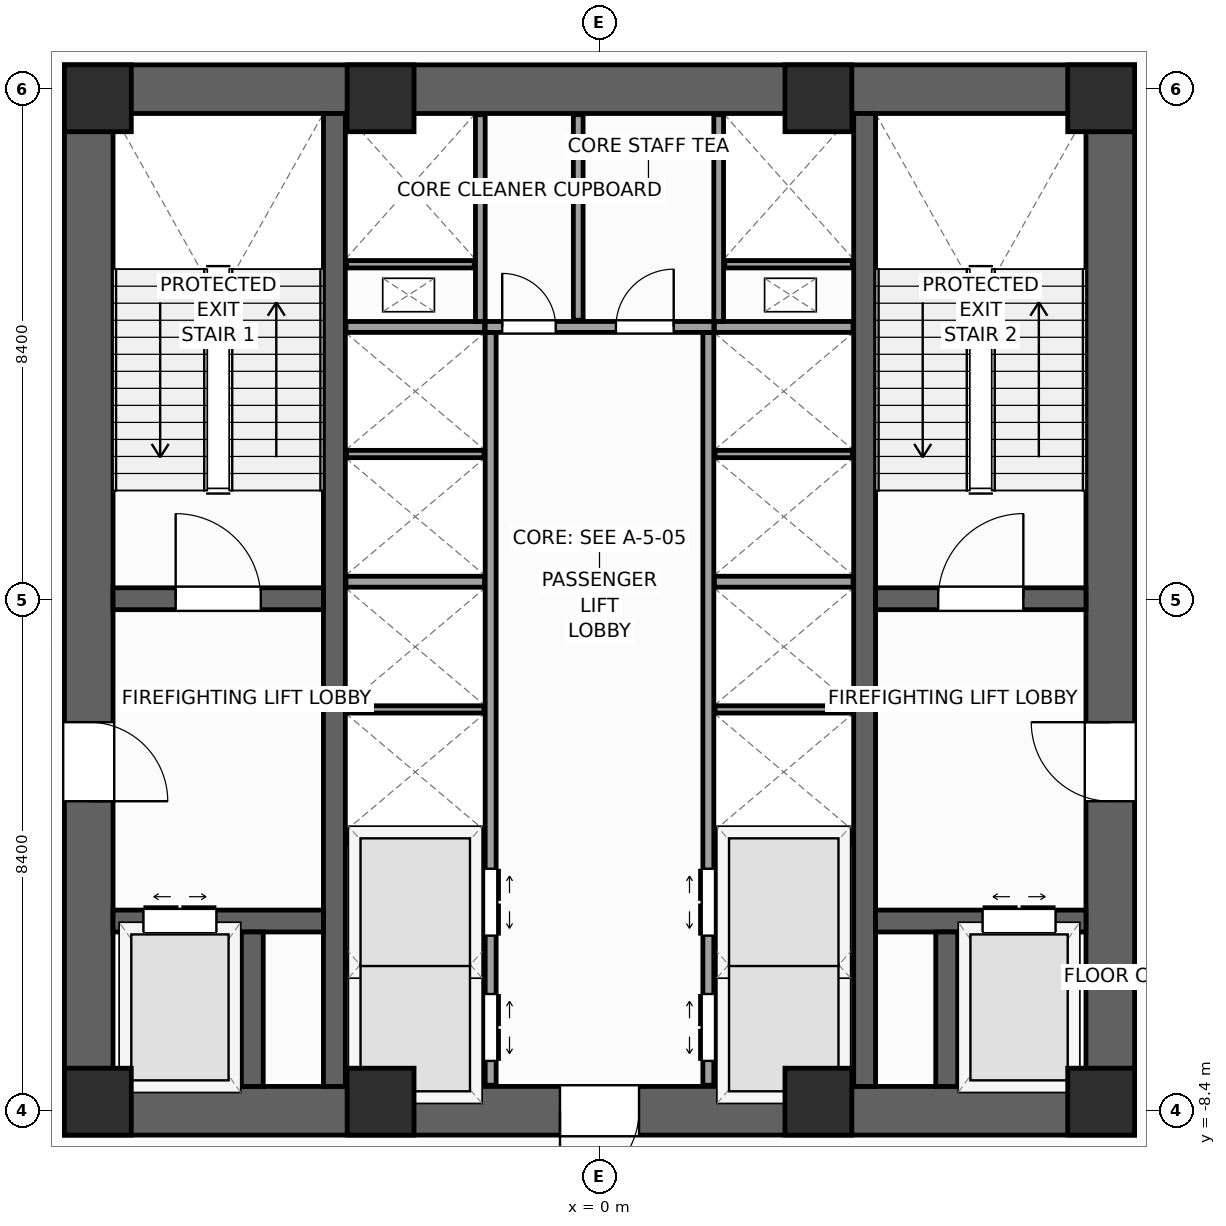
"""IFC4 building model, lengths in metres.
Left out: names, types, materials, properties, quantities, classifications, styles, units other than length and angle.
Written with IfcOpenShell. Run it as: python <this file> out.ifc"""

import sys

from ifc_helpers import new_model, si_unit, direction, frame, frame_2d, origin, origin_2d, place, context, subcontext, project, spatial, rectangle, extrude, source, transform, mapped, element, fill, save


model = new_model("IFC4")
c1 = context("Model", 3, precision=1e-05, world=origin(), true_north=direction((0.0, 1.0)))
c2 = subcontext(c1, "Body", "Model", "MODEL_VIEW")
j1 = project(units=[si_unit("LENGTHUNIT", "METRE"), si_unit("PLANEANGLEUNIT", "RADIAN")], contexts=[c1])
p1 = place(None, origin())
s1 = spatial("IfcSite", under=j1, at=p1, CompositionType="ELEMENT")
p2 = place(p1, origin())
s2 = spatial("IfcBuilding", under=s1, at=p2, CompositionType="ELEMENT")
p3 = place(p2, frame((0.0, 0.0, 11.0)))
s3 = spatial("IfcBuildingStorey", under=s2, at=p3, CompositionType="ELEMENT", Elevation=11.0)
p4 = place(p3, frame((-8.8, -8.4, 0.0), z_axis=(0.0, 0.0, 1.0), x_axis=(1.0, 0.0, 0.0)))
e1 = element("IfcWall", 1, at=p4, inside=s3, PredefinedType="SHEAR", context=c2, shape_type="SweptSolid", body=[
    extrude(rectangle(XDim=17.6, YDim=0.8, at=frame_2d((8.8, 0.0))), origin(), (0.0, 0.0, 1.0), 5.0),
])
p5 = place(p4, frame((8.15, 0.0, 0.0)))
e2 = element("IfcOpeningElement", 2, at=p5, cuts=e1, PredefinedType="OPENING", context=c2, shape_type="SweptSolid", body=[
    extrude(rectangle(XDim=1.3, YDim=2.2, at=frame_2d((0.65, 1.1))), frame((0.0, 0.41, 0.0), z_axis=(0.0, -1.0, 0.0), x_axis=(1.0, 0.0, 0.0)), (0.0, 0.0, 1.0), 0.82),
])
p6 = place(p3, frame((-8.8, 8.4, 0.0), z_axis=(0.0, 0.0, 1.0), x_axis=(1.0, 0.0, 0.0)))
e3 = element("IfcWall", 3, at=p6, inside=s3, PredefinedType="SHEAR", context=c2, shape_type="SweptSolid", body=[
    extrude(rectangle(XDim=17.6, YDim=0.8, at=frame_2d((8.8, 0.0))), origin(), (0.0, 0.0, 1.0), 5.0),
])
p7 = place(p3, frame((-8.4, -8.0, 0.0), z_axis=(0.0, 0.0, 1.0), x_axis=(0.0, 1.0, 0.0)))
e4 = element("IfcWall", 4, at=p7, inside=s3, PredefinedType="SHEAR", context=c2, shape_type="SweptSolid", body=[
    extrude(rectangle(XDim=16.0, YDim=0.8, at=frame_2d((8.0, 0.0))), origin(), (0.0, 0.0, 1.0), 5.0),
])
p8 = place(p7, frame((4.69, 0.0, 0.0)))
e5 = element("IfcOpeningElement", 5, at=p8, cuts=e4, PredefinedType="OPENING", context=c2, shape_type="SweptSolid", body=[
    extrude(rectangle(XDim=1.3, YDim=2.2, at=frame_2d((0.65, 1.1))), frame((0.0, 0.41, 0.0), z_axis=(0.0, -1.0, 0.0), x_axis=(1.0, 0.0, 0.0)), (0.0, 0.0, 1.0), 0.82),
])
p9 = place(p3, frame((8.4, -8.0, 0.0), z_axis=(0.0, 0.0, 1.0), x_axis=(0.0, 1.0, 0.0)))
e6 = element("IfcWall", 6, at=p9, inside=s3, PredefinedType="SHEAR", context=c2, shape_type="SweptSolid", body=[
    extrude(rectangle(XDim=16.0, YDim=0.8, at=frame_2d((8.0, 0.0))), origin(), (0.0, 0.0, 1.0), 5.0),
])
p10 = place(p9, frame((4.69, 0.0, 0.0)))
e7 = element("IfcOpeningElement", 7, at=p10, cuts=e6, PredefinedType="OPENING", context=c2, shape_type="SweptSolid", body=[
    extrude(rectangle(XDim=1.3, YDim=2.2, at=frame_2d((0.65, 1.1))), frame((0.0, 0.41, 0.0), z_axis=(0.0, -1.0, 0.0), x_axis=(1.0, 0.0, 0.0)), (0.0, 0.0, 1.0), 0.82),
])
for number, where, z_axis, x_axis in (
    (8, (-4.36, -8.0, 0.0), (0.0, 0.0, 1.0), (0.0, 1.0, 0.0)),
    (9, (4.36, -8.0, 0.0), (0.0, 0.0, 1.0), (0.0, 1.0, 0.0)),
):
    element("IfcWall", number, at=place(p3, frame(where, z_axis=z_axis, x_axis=x_axis)), inside=s3, PredefinedType="SHEAR", context=c2, shape_type="SweptSolid", body=[
        extrude(rectangle(XDim=16.0, YDim=0.36, at=frame_2d((8.0, 0.0))), origin(), (0.0, 0.0, 1.0), 5.0),
    ])
p11 = place(p3, frame((-8.0, 0.02, 0.0), z_axis=(0.0, 0.0, 1.0), x_axis=(1.0, 0.0, 0.0)))
e10 = element("IfcWall", 10, at=p11, inside=s3, PredefinedType="SHEAR", context=c2, shape_type="SweptSolid", body=[
    extrude(rectangle(XDim=3.46, YDim=0.36, at=frame_2d((1.73, 0.0))), origin(), (0.0, 0.0, 1.0), 5.0),
])
p12 = place(p11, frame((1.03, 0.0, 0.0)))
e11 = element("IfcOpeningElement", 11, at=p12, cuts=e10, PredefinedType="OPENING", context=c2, shape_type="SweptSolid", body=[
    extrude(rectangle(XDim=1.4, YDim=2.2, at=frame_2d((0.7, 1.1))), frame((0.0, 0.19, 0.0), z_axis=(0.0, -1.0, 0.0), x_axis=(1.0, 0.0, 0.0)), (0.0, 0.0, 1.0), 0.38),
])
p13 = place(p3, frame((4.54, 0.02, 0.0), z_axis=(0.0, 0.0, 1.0), x_axis=(1.0, 0.0, 0.0)))
e12 = element("IfcWall", 12, at=p13, inside=s3, PredefinedType="SHEAR", context=c2, shape_type="SweptSolid", body=[
    extrude(rectangle(XDim=3.46, YDim=0.36, at=frame_2d((1.73, 0.0))), origin(), (0.0, 0.0, 1.0), 5.0),
])
p14 = place(p13, frame((1.03, 0.0, 0.0)))
e13 = element("IfcOpeningElement", 13, at=p14, cuts=e12, PredefinedType="OPENING", context=c2, shape_type="SweptSolid", body=[
    extrude(rectangle(XDim=1.4, YDim=2.2, at=frame_2d((0.7, 1.1))), frame((0.0, 0.19, 0.0), z_axis=(0.0, -1.0, 0.0), x_axis=(1.0, 0.0, 0.0)), (0.0, 0.0, 1.0), 0.38),
])
p15 = place(p3, frame((-8.0, -5.28, 0.0), z_axis=(0.0, 0.0, 1.0), x_axis=(1.0, 0.0, 0.0)))
e14 = element("IfcWall", 14, at=p15, inside=s3, PredefinedType="SHEAR", context=c2, shape_type="SweptSolid", body=[
    extrude(rectangle(XDim=3.46, YDim=0.36, at=frame_2d((1.73, 0.0))), origin(), (0.0, 0.0, 1.0), 5.0),
])
p16 = place(p15, frame((0.5, 0.0, 0.0)))
e15 = element("IfcOpeningElement", 15, at=p16, cuts=e14, PredefinedType="OPENING", context=c2, shape_type="SweptSolid", body=[
    extrude(rectangle(XDim=1.2, YDim=2.25, at=frame_2d((0.6, 1.125))), frame((0.0, 0.19, 0.0), z_axis=(0.0, -1.0, 0.0), x_axis=(1.0, 0.0, 0.0)), (0.0, 0.0, 1.0), 0.38),
])
p17 = place(p3, frame((4.54, -5.28, 0.0), z_axis=(0.0, 0.0, 1.0), x_axis=(1.0, 0.0, 0.0)))
e16 = element("IfcWall", 16, at=p17, inside=s3, PredefinedType="SHEAR", context=c2, shape_type="SweptSolid", body=[
    extrude(rectangle(XDim=3.46, YDim=0.36, at=frame_2d((1.73, 0.0))), origin(), (0.0, 0.0, 1.0), 5.0),
])
p18 = place(p17, frame((1.76, 0.0, 0.0)))
e17 = element("IfcOpeningElement", 17, at=p18, cuts=e16, PredefinedType="OPENING", context=c2, shape_type="SweptSolid", body=[
    extrude(rectangle(XDim=1.2, YDim=2.25, at=frame_2d((0.6, 1.125))), frame((0.0, 0.19, 0.0), z_axis=(0.0, -1.0, 0.0), x_axis=(1.0, 0.0, 0.0)), (0.0, 0.0, 1.0), 0.38),
])
for number, where, z_axis, x_axis in (
    (18, (-5.71, -8.0, 0.0), (0.0, 0.0, 1.0), (0.0, 1.0, 0.0)),
    (19, (5.71, -8.0, 0.0), (0.0, 0.0, 1.0), (0.0, 1.0, 0.0)),
):
    element("IfcWall", number, at=place(p3, frame(where, z_axis=z_axis, x_axis=x_axis)), inside=s3, PredefinedType="SHEAR", context=c2, shape_type="SweptSolid", body=[
        extrude(rectangle(XDim=2.54, YDim=0.36, at=frame_2d((1.27, 0.0))), origin(), (0.0, 0.0, 1.0), 5.0),
    ])
m1 = source(origin(), c2, "Body", "SweptSolid", [
    extrude(rectangle(XDim=1.1, YDim=1.1, at=origin_2d()), origin(), (0.0, 0.0, 1.0), 5.0),
])
for number, where, z_axis, x_axis in (
    (20, (-8.25, -8.25, 0.0), (0.0, 0.0, 1.0), (1.0, 0.0, 0.0)),
    (21, (8.25, -8.25, 0.0), (0.0, 0.0, 1.0), (1.0, 0.0, 0.0)),
    (22, (8.25, 8.25, 0.0), (0.0, 0.0, 1.0), (1.0, 0.0, 0.0)),
    (23, (-8.25, 8.25, 0.0), (0.0, 0.0, 1.0), (1.0, 0.0, 0.0)),
    (24, (-3.6, -8.25, 0.0), (0.0, 0.0, 1.0), (1.0, 0.0, 0.0)),
    (25, (3.6, -8.25, 0.0), (0.0, 0.0, 1.0), (1.0, 0.0, 0.0)),
    (26, (-3.6, 8.25, 0.0), (0.0, 0.0, 1.0), (1.0, 0.0, 0.0)),
    (27, (3.6, 8.25, 0.0), (0.0, 0.0, 1.0), (1.0, 0.0, 0.0)),
):
    element("IfcColumn", number, at=place(p3, frame(where, z_axis=z_axis, x_axis=x_axis)), inside=s3, PredefinedType="PILASTER", context=c2, shape_type="MappedRepresentation", body=[
        mapped(m1, transform((0.0, 0.0, 0.0), scale=1.0)),
    ])
p19 = place(p3, frame((-1.79, -7.98, 0.0), z_axis=(0.0, 0.0, 1.0), x_axis=(0.0, 1.0, 0.0)))
e28 = element("IfcWall", 28, at=p19, inside=s3, PredefinedType="PARTITIONING", context=c2, shape_type="SweptSolid", body=[
    extrude(rectangle(XDim=12.38, YDim=0.18, at=frame_2d((6.19, 0.0))), origin(), (0.0, 0.0, 1.0), 4.66),
])
p20 = place(p19, frame((0.4, 0.0, 0.0)))
e29 = element("IfcOpeningElement", 29, at=p20, cuts=e28, PredefinedType="OPENING", context=c2, shape_type="SweptSolid", body=[
    extrude(rectangle(XDim=1.1, YDim=2.2, at=frame_2d((0.55, 1.1))), frame((0.0, 0.1, 0.0), z_axis=(0.0, -1.0, 0.0), x_axis=(1.0, 0.0, 0.0)), (0.0, 0.0, 1.0), 0.2),
])
p21 = place(p19, frame((2.46, 0.0, 0.0)))
e30 = element("IfcOpeningElement", 30, at=p21, cuts=e28, PredefinedType="OPENING", context=c2, shape_type="SweptSolid", body=[
    extrude(rectangle(XDim=1.1, YDim=2.2, at=frame_2d((0.55, 1.1))), frame((0.0, 0.1, 0.0), z_axis=(0.0, -1.0, 0.0), x_axis=(1.0, 0.0, 0.0)), (0.0, 0.0, 1.0), 0.2),
])
p22 = place(p3, frame((1.79, -7.98, 0.0), z_axis=(0.0, 0.0, 1.0), x_axis=(0.0, 1.0, 0.0)))
e31 = element("IfcWall", 31, at=p22, inside=s3, PredefinedType="PARTITIONING", context=c2, shape_type="SweptSolid", body=[
    extrude(rectangle(XDim=12.38, YDim=0.18, at=frame_2d((6.19, 0.0))), origin(), (0.0, 0.0, 1.0), 4.66),
])
p23 = place(p22, frame((0.4, 0.0, 0.0)))
e32 = element("IfcOpeningElement", 32, at=p23, cuts=e31, PredefinedType="OPENING", context=c2, shape_type="SweptSolid", body=[
    extrude(rectangle(XDim=1.1, YDim=2.2, at=frame_2d((0.55, 1.1))), frame((0.0, 0.1, 0.0), z_axis=(0.0, -1.0, 0.0), x_axis=(1.0, 0.0, 0.0)), (0.0, 0.0, 1.0), 0.2),
])
p24 = place(p22, frame((2.46, 0.0, 0.0)))
e33 = element("IfcOpeningElement", 33, at=p24, cuts=e31, PredefinedType="OPENING", context=c2, shape_type="SweptSolid", body=[
    extrude(rectangle(XDim=1.1, YDim=2.2, at=frame_2d((0.55, 1.1))), frame((0.0, 0.1, 0.0), z_axis=(0.0, -1.0, 0.0), x_axis=(1.0, 0.0, 0.0)), (0.0, 0.0, 1.0), 0.2),
])
p25 = place(p3, frame((-1.88, 4.49, 0.0), z_axis=(0.0, 0.0, 1.0), x_axis=(1.0, 0.0, 0.0)))
e34 = element("IfcWall", 34, at=p25, inside=s3, PredefinedType="PARTITIONING", context=c2, shape_type="SweptSolid", body=[
    extrude(rectangle(XDim=3.76, YDim=0.18, at=frame_2d((1.88, 0.0))), origin(), (0.0, 0.0, 1.0), 4.66),
])
p26 = place(p25, frame((0.28, 0.0, 0.0)))
e35 = element("IfcOpeningElement", 35, at=p26, cuts=e34, PredefinedType="OPENING", context=c2, shape_type="SweptSolid", body=[
    extrude(rectangle(XDim=0.88, YDim=2.1, at=frame_2d((0.44, 1.05))), frame((0.0, 0.1, 0.0), z_axis=(0.0, -1.0, 0.0), x_axis=(1.0, 0.0, 0.0)), (0.0, 0.0, 1.0), 0.2),
])
p27 = place(p25, frame((2.15, 0.0, 0.0)))
e36 = element("IfcOpeningElement", 36, at=p27, cuts=e34, PredefinedType="OPENING", context=c2, shape_type="SweptSolid", body=[
    extrude(rectangle(XDim=0.95, YDim=2.1, at=frame_2d((0.475, 1.05))), frame((0.0, 0.1, 0.0), z_axis=(0.0, -1.0, 0.0), x_axis=(1.0, 0.0, 0.0)), (0.0, 0.0, 1.0), 0.2),
])
for number, where, z_axis, x_axis in (
    (37, (-4.17, -3.9, 0.0), (0.0, 0.0, 1.0), (1.0, 0.0, 0.0)),
    (38, (1.89, -3.9, 0.0), (0.0, 0.0, 1.0), (1.0, 0.0, 0.0)),
    (39, (-4.17, 0.3, 0.0), (0.0, 0.0, 1.0), (1.0, 0.0, 0.0)),
    (40, (1.89, 0.3, 0.0), (0.0, 0.0, 1.0), (1.0, 0.0, 0.0)),
    (41, (-4.17, 4.49, 0.0), (0.0, 0.0, 1.0), (1.0, 0.0, 0.0)),
    (42, (1.89, 4.49, 0.0), (0.0, 0.0, 1.0), (1.0, 0.0, 0.0)),
):
    element("IfcWall", number, at=place(p3, frame(where, z_axis=z_axis, x_axis=x_axis)), inside=s3, PredefinedType="PARTITIONING", context=c2, shape_type="SweptSolid", body=[
        extrude(rectangle(XDim=2.28, YDim=0.18, at=frame_2d((1.14, 0.0))), origin(), (0.0, 0.0, 1.0), 4.66),
    ])
for number, where, z_axis, x_axis in (
    (43, (-4.16, -6.0, 0.0), (0.0, 0.0, 1.0), (1.0, 0.0, 0.0)),
    (44, (1.9, -6.0, 0.0), (0.0, 0.0, 1.0), (1.0, 0.0, 0.0)),
    (45, (-4.16, -1.8, 0.0), (0.0, 0.0, 1.0), (1.0, 0.0, 0.0)),
    (46, (1.9, -1.8, 0.0), (0.0, 0.0, 1.0), (1.0, 0.0, 0.0)),
    (47, (-4.16, 2.4, 0.0), (0.0, 0.0, 1.0), (1.0, 0.0, 0.0)),
    (48, (1.9, 2.4, 0.0), (0.0, 0.0, 1.0), (1.0, 0.0, 0.0)),
):
    element("IfcWall", number, at=place(p3, frame(where, z_axis=z_axis, x_axis=x_axis)), inside=s3, PredefinedType="PARTITIONING", context=c2, shape_type="SweptSolid", body=[
        extrude(rectangle(XDim=2.26, YDim=0.12, at=frame_2d((1.13, 0.0))), origin(), (0.0, 0.0, 1.0), 4.66),
    ])
for number, where, z_axis, x_axis in (
    (49, (-1.96, 4.58, 0.0), (0.0, 0.0, 1.0), (0.0, 1.0, 0.0)),
    (50, (1.96, 4.58, 0.0), (0.0, 0.0, 1.0), (0.0, 1.0, 0.0)),
):
    element("IfcWall", number, at=place(p3, frame(where, z_axis=z_axis, x_axis=x_axis)), inside=s3, PredefinedType="PARTITIONING", context=c2, shape_type="SweptSolid", body=[
        extrude(rectangle(XDim=3.4, YDim=0.16, at=frame_2d((1.7, 0.0))), origin(), (0.0, 0.0, 1.0), 4.66),
    ])
for number, where, z_axis, x_axis in (
    (51, (-4.16, 5.52, 0.0), (0.0, 0.0, 1.0), (1.0, 0.0, 0.0)),
    (52, (2.06, 5.52, 0.0), (0.0, 0.0, 1.0), (1.0, 0.0, 0.0)),
):
    element("IfcWall", number, at=place(p3, frame(where, z_axis=z_axis, x_axis=x_axis)), inside=s3, PredefinedType="PARTITIONING", context=c2, shape_type="SweptSolid", body=[
        extrude(rectangle(XDim=2.1, YDim=0.12, at=frame_2d((1.05, 0.0))), origin(), (0.0, 0.0, 1.0), 4.66),
    ])
p28 = place(p3, frame((-0.35, 4.6, 0.0), z_axis=(0.0, 0.0, 1.0), x_axis=(0.0, 1.0, 0.0)))
e53 = element("IfcWall", 53, at=p28, inside=s3, PredefinedType="PARTITIONING", context=c2, shape_type="SweptSolid", body=[
    extrude(rectangle(XDim=3.38, YDim=0.16, at=frame_2d((1.69, 0.0))), origin(), (0.0, 0.0, 1.0), 4.66),
])
m2 = source(origin(), c2, "Body", "SweptSolid", [
    extrude(rectangle(XDim=1.4, YDim=2.2, at=frame_2d((0.7, 1.1))), frame((0.0, 0.025, 0.0), z_axis=(0.0, -1.0, 0.0), x_axis=(1.0, 0.0, 0.0)), (0.0, 0.0, 1.0), 0.05),
])
p29 = place(p12, origin())
e54 = element("IfcDoor", 54, at=p29, inside=s3, OperationType="SINGLE_SWING_LEFT", PredefinedType="DOOR", context=c2, shape_type="MappedRepresentation", body=[
    mapped(m2, transform((0.0, 0.0, 0.0), scale=1.0)),
])
fill(e11, e54)
p30 = place(p14, origin())
e55 = element("IfcDoor", 55, at=p30, inside=s3, OperationType="SINGLE_SWING_RIGHT", PredefinedType="DOOR", context=c2, shape_type="MappedRepresentation", body=[
    mapped(m2, transform((0.0, 0.0, 0.0), scale=1.0)),
])
fill(e13, e55)
m3 = source(origin(), c2, "Body", "SweptSolid", [
    extrude(rectangle(XDim=1.3, YDim=2.2, at=frame_2d((0.65, 1.1))), frame((0.0, 0.025, 0.0), z_axis=(0.0, -1.0, 0.0), x_axis=(1.0, 0.0, 0.0)), (0.0, 0.0, 1.0), 0.05),
])
p31 = place(p8, frame((1.3, 0.0, 0.0), z_axis=(0.0, 0.0, 1.0), x_axis=(-1.0, 0.0, 0.0)))
e56 = element("IfcDoor", 56, at=p31, inside=s3, OperationType="SINGLE_SWING_LEFT", PredefinedType="DOOR", context=c2, shape_type="MappedRepresentation", body=[
    mapped(m3, transform((0.0, 0.0, 0.0), scale=1.0)),
])
fill(e5, e56)
p32 = place(p10, origin())
e57 = element("IfcDoor", 57, at=p32, inside=s3, OperationType="SINGLE_SWING_RIGHT", PredefinedType="DOOR", context=c2, shape_type="MappedRepresentation", body=[
    mapped(m3, transform((0.0, 0.0, 0.0), scale=1.0)),
])
fill(e7, e57)
p33 = place(p5, frame((1.3, 0.0, 0.0), z_axis=(0.0, 0.0, 1.0), x_axis=(-1.0, 0.0, 0.0)))
e58 = element("IfcDoor", 58, at=p33, inside=s3, OperationType="SINGLE_SWING_LEFT", PredefinedType="DOOR", context=c2, shape_type="MappedRepresentation", body=[
    mapped(m3, transform((0.0, 0.0, 0.0), scale=1.0)),
])
fill(e2, e58)
m4 = source(origin(), c2, "Body", "SweptSolid", [
    extrude(rectangle(XDim=1.2, YDim=2.25, at=frame_2d((0.6, 1.125))), frame((0.0, 0.025, 0.0), z_axis=(0.0, -1.0, 0.0), x_axis=(1.0, 0.0, 0.0)), (0.0, 0.0, 1.0), 0.05),
])
p34 = place(p16, origin())
e59 = element("IfcDoor", 59, at=p34, inside=s3, OperationType="DOUBLE_DOOR_SLIDING", PredefinedType="DOOR", context=c2, shape_type="MappedRepresentation", body=[
    mapped(m4, transform((0.0, 0.0, 0.0), scale=1.0)),
])
fill(e15, e59)
p35 = place(p18, origin())
e60 = element("IfcDoor", 60, at=p35, inside=s3, OperationType="DOUBLE_DOOR_SLIDING", PredefinedType="DOOR", context=c2, shape_type="MappedRepresentation", body=[
    mapped(m4, transform((0.0, 0.0, 0.0), scale=1.0)),
])
fill(e17, e60)
m5 = source(origin(), c2, "Body", "SweptSolid", [
    extrude(rectangle(XDim=1.1, YDim=2.2, at=frame_2d((0.55, 1.1))), frame((0.0, 0.025, 0.0), z_axis=(0.0, -1.0, 0.0), x_axis=(1.0, 0.0, 0.0)), (0.0, 0.0, 1.0), 0.05),
])
p36 = place(p20, frame((1.1, 0.0, 0.0), z_axis=(0.0, 0.0, 1.0), x_axis=(-1.0, 0.0, 0.0)))
e61 = element("IfcDoor", 61, at=p36, inside=s3, OperationType="DOUBLE_DOOR_SLIDING", PredefinedType="DOOR", context=c2, shape_type="MappedRepresentation", body=[
    mapped(m5, transform((0.0, 0.0, 0.0), scale=1.0)),
])
fill(e29, e61)
p37 = place(p21, frame((1.1, 0.0, 0.0), z_axis=(0.0, 0.0, 1.0), x_axis=(-1.0, 0.0, 0.0)))
e62 = element("IfcDoor", 62, at=p37, inside=s3, OperationType="DOUBLE_DOOR_SLIDING", PredefinedType="DOOR", context=c2, shape_type="MappedRepresentation", body=[
    mapped(m5, transform((0.0, 0.0, 0.0), scale=1.0)),
])
fill(e30, e62)
p38 = place(p23, origin())
e63 = element("IfcDoor", 63, at=p38, inside=s3, OperationType="DOUBLE_DOOR_SLIDING", PredefinedType="DOOR", context=c2, shape_type="MappedRepresentation", body=[
    mapped(m5, transform((0.0, 0.0, 0.0), scale=1.0)),
])
fill(e32, e63)
p39 = place(p24, origin())
e64 = element("IfcDoor", 64, at=p39, inside=s3, OperationType="DOUBLE_DOOR_SLIDING", PredefinedType="DOOR", context=c2, shape_type="MappedRepresentation", body=[
    mapped(m5, transform((0.0, 0.0, 0.0), scale=1.0)),
])
fill(e33, e64)
m6 = source(origin(), c2, "Body", "SweptSolid", [
    extrude(rectangle(XDim=0.88, YDim=2.1, at=frame_2d((0.44, 1.05))), frame((0.0, 0.025, 0.0), z_axis=(0.0, -1.0, 0.0), x_axis=(1.0, 0.0, 0.0)), (0.0, 0.0, 1.0), 0.05),
])
p40 = place(p26, origin())
e65 = element("IfcDoor", 65, at=p40, inside=s3, OperationType="SINGLE_SWING_LEFT", PredefinedType="DOOR", context=c2, shape_type="MappedRepresentation", body=[
    mapped(m6, transform((0.0, 0.0, 0.0), scale=1.0)),
])
fill(e35, e65)
m7 = source(origin(), c2, "Body", "SweptSolid", [
    extrude(rectangle(XDim=0.95, YDim=2.1, at=frame_2d((0.475, 1.05))), frame((0.0, 0.025, 0.0), z_axis=(0.0, -1.0, 0.0), x_axis=(1.0, 0.0, 0.0)), (0.0, 0.0, 1.0), 0.05),
])
p41 = place(p27, origin())
e66 = element("IfcDoor", 66, at=p41, inside=s3, OperationType="SINGLE_SWING_RIGHT", PredefinedType="DOOR", context=c2, shape_type="MappedRepresentation", body=[
    mapped(m7, transform((0.0, 0.0, 0.0), scale=1.0)),
])
fill(e36, e66)
save(model, sys.argv[1])
